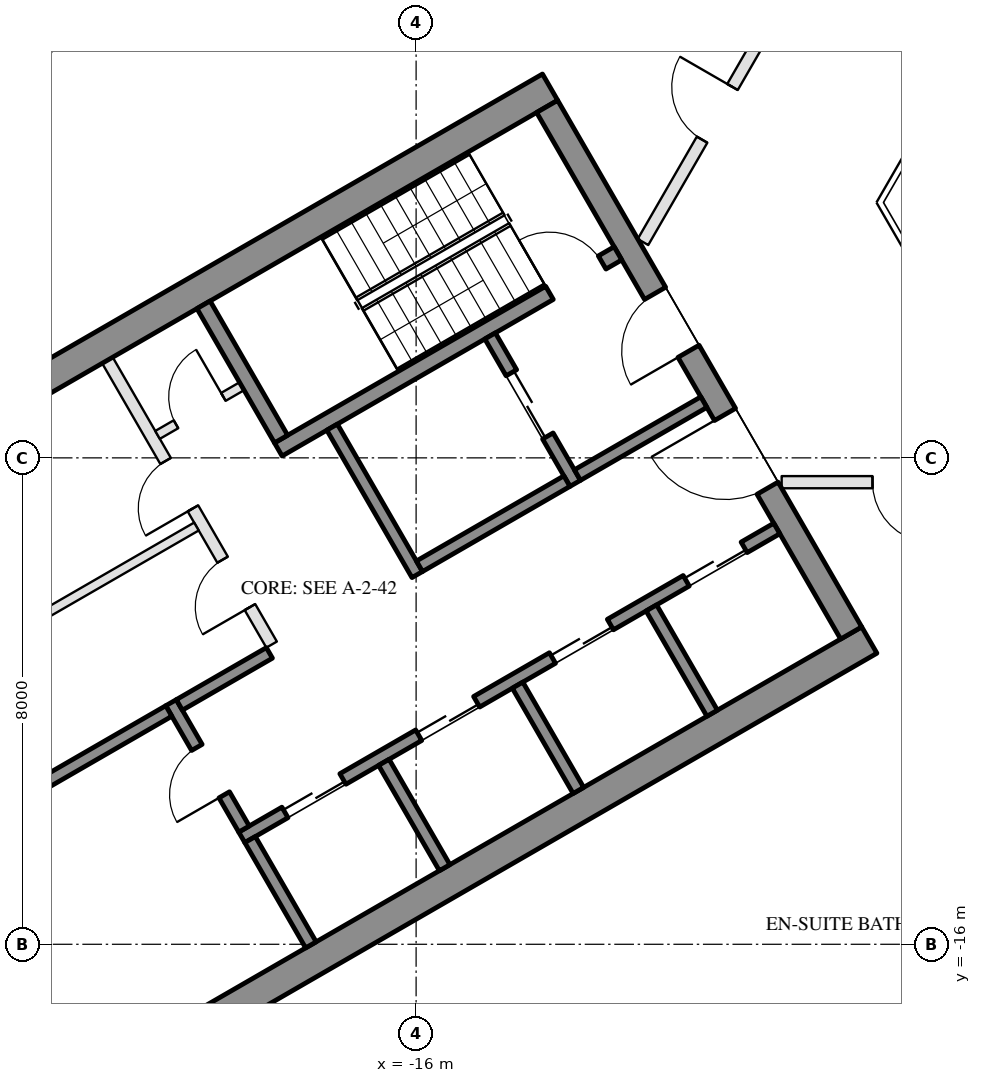
"""IFC4 building model, lengths in metres.
Left out: names, types, materials, properties, quantities, classifications, styles, units other than length and angle.
Written with IfcOpenShell. Run it as: python <this file> out.ifc"""

import sys

from ifc_helpers import new_model, si_unit, direction, frame, frame_2d, origin, place, context, subcontext, project, spatial, rectangle, extrude, element, fill, save


model = new_model("IFC4")
c1 = context("Model", 3, precision=1e-05, world=origin(), true_north=direction((0.0, 1.0)))
c2 = subcontext(c1, "Body", "Model", "MODEL_VIEW")
j1 = project(units=[si_unit("LENGTHUNIT", "METRE"), si_unit("PLANEANGLEUNIT", "RADIAN")], contexts=[c1])
p1 = place(None, origin())
s1 = spatial("IfcSite", under=j1, at=p1, CompositionType="ELEMENT")
p2 = place(p1, origin())
s2 = spatial("IfcBuilding", under=s1, at=p2, CompositionType="ELEMENT")
p3 = place(p2, frame((0.0, 0.0, 179.9)))
s3 = spatial("IfcBuildingStorey", under=s2, at=p3, CompositionType="ELEMENT", Elevation=179.9)
p4 = place(p3, frame((-20.309, 1.934, 0.0), z_axis=(0.0, 0.0, 1.0), x_axis=(-0.499992114976, -0.866029956157, 0.0)))
e1 = element("IfcWall", 1, at=p4, inside=s3, PredefinedType="SOLIDWALL", context=c2, shape_type="SweptSolid", body=[
    extrude(rectangle(XDim=6.74, YDim=0.35, at=frame_2d((3.37, 0.0))), origin(), (0.0, 0.0, 1.0), 3.55),
])
p5 = place(p4, frame((0.77, 0.0, 0.0)))
e2 = element("IfcOpeningElement", 2, at=p5, cuts=e1, PredefinedType="OPENING", context=c2, shape_type="SweptSolid", body=[
    extrude(rectangle(XDim=2.4, YDim=2.4, at=frame_2d((1.2, 1.2))), frame((0.0, 0.185, 0.0), z_axis=(0.0, -1.0, 0.0), x_axis=(1.0, 0.0, 0.0)), (0.0, 0.0, 1.0), 0.37),
])
p6 = place(p4, frame((3.47, 0.0, 0.3)))
e3 = element("IfcOpeningElement", 3, at=p6, cuts=e1, PredefinedType="OPENING", context=c2, shape_type="SweptSolid", body=[
    extrude(rectangle(XDim=2.9, YDim=2.65, at=frame_2d((1.45, 1.325))), frame((0.0, 0.185, 0.0), z_axis=(0.0, -1.0, 0.0), x_axis=(1.0, 0.0, 0.0)), (0.0, 0.0, 1.0), 0.37),
])
for number, where, z_axis, x_axis in (
    (4, (-13.797, -1.903, 0.0), (0.0, 0.0, 1.0), (-0.866, -0.5, 0.0)),
    (5, (-8.547, -10.997, 0.0), (0.0, 0.0, 1.0), (-0.866, -0.5, 0.0)),
):
    element("IfcWall", number, at=place(p3, frame(where, z_axis=z_axis, x_axis=x_axis)), inside=s3, PredefinedType="SHEAR", context=c2, shape_type="SweptSolid", body=[
        extrude(rectangle(XDim=14.837, YDim=0.5, at=frame_2d((7.418, 0.0))), origin(), (0.0, 0.0, 1.0), 3.5),
    ])
p7 = place(p3, frame((-13.845, -2.22, 0.0), z_axis=(0.0, 0.0, 1.0), x_axis=(0.500004234368, -0.866022959057, 0.0)))
e6 = element("IfcWall", 6, at=p7, inside=s3, PredefinedType="SHEAR", context=c2, shape_type="SweptSolid", body=[
    extrude(rectangle(XDim=10.0, YDim=0.4, at=frame_2d((5.0, 0.0))), origin(), (0.0, 0.0, 1.0), 3.5),
])
p8 = place(p7, frame((3.55, 0.0, 0.0)))
e7 = element("IfcOpeningElement", 7, at=p8, cuts=e6, PredefinedType="OPENING", context=c2, shape_type="SweptSolid", body=[
    extrude(rectangle(XDim=1.1, YDim=2.1, at=frame_2d((0.55, 1.05))), frame((0.0, 0.21, 0.0), z_axis=(0.0, -1.0, 0.0), x_axis=(1.0, 0.0, 0.0)), (0.0, 0.0, 1.0), 0.42),
])
p9 = place(p7, frame((5.85, 0.0, 0.0)))
e8 = element("IfcOpeningElement", 8, at=p9, cuts=e6, PredefinedType="OPENING", context=c2, shape_type="SweptSolid", body=[
    extrude(rectangle(XDim=1.4, YDim=2.1, at=frame_2d((0.7, 1.05))), frame((0.0, 0.21, 0.0), z_axis=(0.0, -1.0, 0.0), x_axis=(1.0, 0.0, 0.0)), (0.0, 0.0, 1.0), 0.42),
])
p10 = place(p3, frame((-12.681, -4.636, 0.0), z_axis=(0.0, 0.0, 1.0), x_axis=(-0.866021702275, -0.500006411147, 0.0)))
e9 = element("IfcWall", 9, at=p10, inside=s3, PredefinedType="SHEAR", context=c2, shape_type="SweptSolid", body=[
    extrude(rectangle(XDim=6.45, YDim=0.25, at=frame_2d((3.225, 0.0))), origin(), (0.0, 0.0, 1.0), 3.5),
])
p11 = place(p10, frame((0.3, 0.0, 0.0)))
e10 = element("IfcOpeningElement", 10, at=p11, cuts=e9, PredefinedType="OPENING", context=c2, shape_type="SweptSolid", body=[
    extrude(rectangle(XDim=1.0, YDim=2.1, at=frame_2d((0.5, 1.05))), frame((0.0, 0.135, 0.0), z_axis=(0.0, -1.0, 0.0), x_axis=(1.0, 0.0, 0.0)), (0.0, 0.0, 1.0), 0.27),
])
p12 = place(p3, frame((-19.496, -5.482, 0.0), z_axis=(0.0, 0.0, 1.0), x_axis=(0.499990435942, -0.866030925526, 0.0)))
e11 = element("IfcWall", 11, at=p12, inside=s3, PredefinedType="SHEAR", context=c2, shape_type="SweptSolid", body=[
    extrude(rectangle(XDim=2.55, YDim=0.25, at=frame_2d((1.275, 0.0))), origin(), (0.0, 0.0, 1.0), 3.5),
])
p13 = place(p3, frame((-17.381, -7.495, 0.0), z_axis=(0.0, 0.0, 1.0), x_axis=(0.500011755427, -0.866018616679, 0.0)))
e12 = element("IfcWall", 12, at=p13, inside=s3, PredefinedType="SHEAR", context=c2, shape_type="SweptSolid", body=[
    extrude(rectangle(XDim=2.8, YDim=0.2, at=frame_2d((1.4, 0.0))), origin(), (0.0, 0.0, 1.0), 3.5),
])
p14 = place(p3, frame((-14.783, -5.995, 0.0), z_axis=(0.0, 0.0, 1.0), x_axis=(0.49994636267, -0.866056369097, 0.0)))
e13 = element("IfcWall", 13, at=p14, inside=s3, PredefinedType="SHEAR", context=c2, shape_type="SweptSolid", body=[
    extrude(rectangle(XDim=2.8, YDim=0.2, at=frame_2d((1.4, 0.0))), origin(), (0.0, 0.0, 1.0), 3.5),
])
p15 = place(p14, frame((0.7, 0.0, 0.0)))
e14 = element("IfcOpeningElement", 14, at=p15, cuts=e13, PredefinedType="OPENING", context=c2, shape_type="SweptSolid", body=[
    extrude(rectangle(XDim=1.2, YDim=2.1, at=frame_2d((0.6, 1.05))), frame((0.0, 0.11, 0.0), z_axis=(0.0, -1.0, 0.0), x_axis=(1.0, 0.0, 0.0)), (0.0, 0.0, 1.0), 0.22),
])
p16 = place(p3, frame((-13.52, -8.383, 0.0), z_axis=(0.0, 0.0, 1.0), x_axis=(-0.866034573852, -0.49998411664, 0.0)))
e15 = element("IfcWall", 15, at=p16, inside=s3, PredefinedType="SHEAR", context=c2, shape_type="SweptSolid", body=[
    extrude(rectangle(XDim=2.8, YDim=0.2, at=frame_2d((1.4, 0.0))), origin(), (0.0, 0.0, 1.0), 3.5),
])
p17 = place(p3, frame((-11.268, -7.083, 0.0), z_axis=(0.0, 0.0, 1.0), x_axis=(-0.866050077142, -0.499957262057, 0.0)))
e16 = element("IfcWall", 16, at=p17, inside=s3, PredefinedType="SHEAR", context=c2, shape_type="SweptSolid", body=[
    extrude(rectangle(XDim=2.4, YDim=0.2, at=frame_2d((1.2, 0.0))), origin(), (0.0, 0.0, 1.0), 3.5),
])
p18 = place(p3, frame((-10.068, -9.162, 0.0), z_axis=(0.0, 0.0, 1.0), x_axis=(-0.866032725843, -0.499987317609, 0.0)))
e17 = element("IfcWall", 17, at=p18, inside=s3, PredefinedType="SHEAR", context=c2, shape_type="SweptSolid", body=[
    extrude(rectangle(XDim=10.16, YDim=0.2, at=frame_2d((5.08, 0.0))), origin(), (0.0, 0.0, 1.0), 3.5),
])
p19 = place(p18, frame((0.62, 0.0, 0.0)))
e18 = element("IfcOpeningElement", 18, at=p19, cuts=e17, PredefinedType="OPENING", context=c2, shape_type="SweptSolid", body=[
    extrude(rectangle(XDim=1.1, YDim=2.1, at=frame_2d((0.55, 1.05))), frame((0.0, 0.11, 0.0), z_axis=(0.0, -1.0, 0.0), x_axis=(1.0, 0.0, 0.0)), (0.0, 0.0, 1.0), 0.22),
])
p20 = place(p18, frame((3.16, 0.0, 0.0)))
e19 = element("IfcOpeningElement", 19, at=p20, cuts=e17, PredefinedType="OPENING", context=c2, shape_type="SweptSolid", body=[
    extrude(rectangle(XDim=1.1, YDim=2.1, at=frame_2d((0.55, 1.05))), frame((0.0, 0.11, 0.0), z_axis=(0.0, -1.0, 0.0), x_axis=(1.0, 0.0, 0.0)), (0.0, 0.0, 1.0), 0.22),
])
p21 = place(p18, frame((5.7, 0.0, 0.0)))
e20 = element("IfcOpeningElement", 20, at=p21, cuts=e17, PredefinedType="OPENING", context=c2, shape_type="SweptSolid", body=[
    extrude(rectangle(XDim=1.1, YDim=2.1, at=frame_2d((0.55, 1.05))), frame((0.0, 0.11, 0.0), z_axis=(0.0, -1.0, 0.0), x_axis=(1.0, 0.0, 0.0)), (0.0, 0.0, 1.0), 0.22),
])
p22 = place(p18, frame((8.24, 0.0, 0.0)))
e21 = element("IfcOpeningElement", 21, at=p22, cuts=e17, PredefinedType="OPENING", context=c2, shape_type="SweptSolid", body=[
    extrude(rectangle(XDim=1.1, YDim=2.1, at=frame_2d((0.55, 1.05))), frame((0.0, 0.11, 0.0), z_axis=(0.0, -1.0, 0.0), x_axis=(1.0, 0.0, 0.0)), (0.0, 0.0, 1.0), 0.22),
])
p23 = place(p3, frame((-20.031, -12.026, 0.0), z_axis=(0.0, 0.0, 1.0), x_axis=(0.500033551112, -0.866006032174, 0.0)))
e22 = element("IfcWall", 22, at=p23, inside=s3, PredefinedType="SHEAR", context=c2, shape_type="SweptSolid", body=[
    extrude(rectangle(XDim=2.4, YDim=0.2, at=frame_2d((1.2, 0.0))), origin(), (0.0, 0.0, 1.0), 3.5),
])
p24 = place(p23, frame((0.85, 0.0, 0.0)))
e23 = element("IfcOpeningElement", 23, at=p24, cuts=e22, PredefinedType="OPENING", context=c2, shape_type="SweptSolid", body=[
    extrude(rectangle(XDim=0.9, YDim=2.1, at=frame_2d((0.45, 1.05))), frame((0.0, 0.11, 0.0), z_axis=(0.0, -1.0, 0.0), x_axis=(1.0, 0.0, 0.0)), (0.0, 0.0, 1.0), 0.22),
])
p25 = place(p3, frame((-18.413, -11.208, 0.0), z_axis=(0.0, 0.0, 1.0), x_axis=(-0.866038183914, -0.499977863513, 0.0)))
e24 = element("IfcWall", 24, at=p25, inside=s3, PredefinedType="SHEAR", context=c2, shape_type="SweptSolid", body=[
    extrude(rectangle(XDim=1.71, YDim=0.2, at=frame_2d((0.855, 0.0))), origin(), (0.0, 0.0, 1.0), 3.5),
])
for number, where, z_axis, x_axis in (
    (25, (-12.131, -10.468, 0.0), (0.0, 0.0, 1.0), (0.5, -0.866, 0.0)),
    (26, (-14.331, -11.738, 0.0), (0.0, 0.0, 1.0), (0.5, -0.866, 0.0)),
    (27, (-16.531, -13.008, 0.0), (0.0, 0.0, 1.0), (0.5, -0.866, 0.0)),
    (28, (-18.73, -14.278, 0.0), (0.0, 0.0, 1.0), (0.5, -0.866, 0.0)),
):
    element("IfcWall", number, at=place(p3, frame(where, z_axis=z_axis, x_axis=x_axis)), inside=s3, PredefinedType="SHEAR", context=c2, shape_type="SweptSolid", body=[
        extrude(rectangle(XDim=2.0, YDim=0.2, at=frame_2d((1.0, 0.0))), origin(), (0.0, 0.0, 1.0), 3.5),
    ])
p26 = place(p3, frame((-20.067, -12.163, 0.0), z_axis=(0.0, 0.0, 1.0), x_axis=(-0.866055327414, -0.49994816717, 0.0)))
e29 = element("IfcWall", 29, at=p26, inside=s3, PredefinedType="SHEAR", context=c2, shape_type="SweptSolid", body=[
    extrude(rectangle(XDim=2.84, YDim=0.2, at=frame_2d((1.42, 0.0))), origin(), (0.0, 0.0, 1.0), 3.5),
])
p27 = place(p3, frame((-21.076, -6.395, 0.0), z_axis=(0.0, 0.0, 1.0), x_axis=(0.50001468107, -0.866016927499, 0.0)))
e30 = element("IfcWall", 30, at=p27, inside=s3, PredefinedType="PARTITIONING", context=c2, shape_type="SweptSolid", body=[
    extrude(rectangle(XDim=5.4, YDim=0.2, at=frame_2d((2.7, 0.0))), origin(), (0.0, 0.0, 1.0), 3.5),
])
p28 = place(p27, frame((1.913, 0.0, 0.0)))
e31 = element("IfcOpeningElement", 31, at=p28, cuts=e30, PredefinedType="OPENING", context=c2, shape_type="SweptSolid", body=[
    extrude(rectangle(XDim=0.9, YDim=2.1, at=frame_2d((0.45, 1.05))), frame((0.0, 0.11, 0.0), z_axis=(0.0, -1.0, 0.0), x_axis=(1.0, 0.0, 0.0)), (0.0, 0.0, 1.0), 0.22),
])
p29 = place(p27, frame((3.788, 0.0, 0.0)))
e32 = element("IfcOpeningElement", 32, at=p29, cuts=e30, PredefinedType="OPENING", context=c2, shape_type="SweptSolid", body=[
    extrude(rectangle(XDim=0.9, YDim=2.1, at=frame_2d((0.45, 1.05))), frame((0.0, 0.11, 0.0), z_axis=(0.0, -1.0, 0.0), x_axis=(1.0, 0.0, 0.0)), (0.0, 0.0, 1.0), 0.22),
])
p30 = place(p3, frame((-18.866, -6.822, 0.0), z_axis=(0.0, 0.0, 1.0), x_axis=(-0.866028054938, -0.499995408039, 0.0)))
e33 = element("IfcWall", 33, at=p30, inside=s3, PredefinedType="PARTITIONING", context=c2, shape_type="SweptSolid", body=[
    extrude(rectangle(XDim=1.6, YDim=0.15, at=frame_2d((0.8, 0.0))), origin(), (0.0, 0.0, 1.0), 3.5),
])
p31 = place(p30, frame((0.35, 0.0, 0.0)))
e34 = element("IfcOpeningElement", 34, at=p31, cuts=e33, PredefinedType="OPENING", context=c2, shape_type="SweptSolid", body=[
    extrude(rectangle(XDim=0.9, YDim=2.1, at=frame_2d((0.45, 1.05))), frame((0.0, 0.085, 0.0), z_axis=(0.0, -1.0, 0.0), x_axis=(1.0, 0.0, 0.0)), (0.0, 0.0, 1.0), 0.17),
])
p32 = place(p3, frame((-19.613, -9.13, 0.0), z_axis=(0.0, 0.0, 1.0), x_axis=(-0.866031734426, -0.499989034847, 0.0)))
e35 = element("IfcWall", 35, at=p32, inside=s3, PredefinedType="PARTITIONING", context=c2, shape_type="SweptSolid", body=[
    extrude(rectangle(XDim=6.95, YDim=0.15, at=frame_2d((3.475, 0.0))), origin(), (0.0, 0.0, 1.0), 3.5),
])
p33 = place(p3, frame((-6.0, -8.4, 0.0), z_axis=(0.0, 0.0, 1.0), x_axis=(-1.0, 0.0, 0.0)))
e36 = element("IfcWall", 36, at=p33, inside=s3, PredefinedType="PARTITIONING", context=c2, shape_type="SweptSolid", body=[
    extrude(rectangle(XDim=3.988, YDim=0.2, at=frame_2d((1.994, 0.0))), origin(), (0.0, 0.0, 1.0), 2.95),
])
p34 = place(p33, frame((1.494, 0.0, 0.0)))
e37 = element("IfcOpeningElement", 37, at=p34, cuts=e36, PredefinedType="OPENING", context=c2, shape_type="SweptSolid", body=[
    extrude(rectangle(XDim=1.0, YDim=2.1, at=frame_2d((0.5, 1.05))), frame((0.0, 0.11, 0.0), z_axis=(0.0, -1.0, 0.0), x_axis=(1.0, 0.0, 0.0)), (0.0, 0.0, 1.0), 0.22),
])
p35 = place(p3, frame((-12.269, -4.45, 0.0), z_axis=(0.0, 0.0, 1.0), x_axis=(0.500012125002, 0.866018403298, 0.0)))
e38 = element("IfcWall", 38, at=p35, inside=s3, PredefinedType="PARTITIONING", context=c2, shape_type="SweptSolid", body=[
    extrude(rectangle(XDim=4.888, YDim=0.2, at=frame_2d((2.444, 0.0))), origin(), (0.0, 0.0, 1.0), 2.95),
])
p36 = place(p35, frame((1.944, 0.0, 0.0)))
e39 = element("IfcOpeningElement", 39, at=p36, cuts=e38, PredefinedType="OPENING", context=c2, shape_type="SweptSolid", body=[
    extrude(rectangle(XDim=1.0, YDim=2.1, at=frame_2d((0.5, 1.05))), frame((0.0, 0.11, 0.0), z_axis=(0.0, -1.0, 0.0), x_axis=(1.0, 0.0, 0.0)), (0.0, 0.0, 1.0), 0.22),
])
p37 = place(p15, origin())
e40 = element("IfcDoor", 40, at=p37, inside=s3, OperationType="DOUBLE_DOOR_SLIDING", PredefinedType="DOOR", context=c2, shape_type="SweptSolid", body=[
    extrude(rectangle(XDim=1.2, YDim=2.1, at=frame_2d((0.6, 1.05))), frame((0.0, 0.025, 0.0), z_axis=(0.0, -1.0, 0.0), x_axis=(1.0, 0.0, 0.0)), (0.0, 0.0, 1.0), 0.05),
])
fill(e14, e40)
p38 = place(p31, frame((0.9, 0.0, 0.0), z_axis=(0.0, 0.0, 1.0), x_axis=(-1.0, 0.0, 0.0)))
e41 = element("IfcDoor", 41, at=p38, inside=s3, OperationType="SINGLE_SWING_RIGHT", PredefinedType="DOOR", context=c2, shape_type="SweptSolid", body=[
    extrude(rectangle(XDim=0.9, YDim=2.1, at=frame_2d((0.45, 1.05))), frame((0.0, 0.025, 0.0), z_axis=(0.0, -1.0, 0.0), x_axis=(1.0, 0.0, 0.0)), (0.0, 0.0, 1.0), 0.05),
])
fill(e34, e41)
p39 = place(p19, origin())
e42 = element("IfcDoor", 42, at=p39, inside=s3, OperationType="DOUBLE_DOOR_SLIDING", PredefinedType="DOOR", context=c2, shape_type="SweptSolid", body=[
    extrude(rectangle(XDim=1.1, YDim=2.1, at=frame_2d((0.55, 1.05))), frame((0.0, 0.025, 0.0), z_axis=(0.0, -1.0, 0.0), x_axis=(1.0, 0.0, 0.0)), (0.0, 0.0, 1.0), 0.05),
])
fill(e18, e42)
p40 = place(p20, origin())
e43 = element("IfcDoor", 43, at=p40, inside=s3, OperationType="DOUBLE_DOOR_SLIDING", PredefinedType="DOOR", context=c2, shape_type="SweptSolid", body=[
    extrude(rectangle(XDim=1.1, YDim=2.1, at=frame_2d((0.55, 1.05))), frame((0.0, 0.025, 0.0), z_axis=(0.0, -1.0, 0.0), x_axis=(1.0, 0.0, 0.0)), (0.0, 0.0, 1.0), 0.05),
])
fill(e19, e43)
p41 = place(p21, origin())
e44 = element("IfcDoor", 44, at=p41, inside=s3, OperationType="DOUBLE_DOOR_SLIDING", PredefinedType="DOOR", context=c2, shape_type="SweptSolid", body=[
    extrude(rectangle(XDim=1.1, YDim=2.1, at=frame_2d((0.55, 1.05))), frame((0.0, 0.025, 0.0), z_axis=(0.0, -1.0, 0.0), x_axis=(1.0, 0.0, 0.0)), (0.0, 0.0, 1.0), 0.05),
])
fill(e20, e44)
p42 = place(p22, origin())
e45 = element("IfcDoor", 45, at=p42, inside=s3, OperationType="DOUBLE_DOOR_SLIDING", PredefinedType="DOOR", context=c2, shape_type="SweptSolid", body=[
    extrude(rectangle(XDim=1.1, YDim=2.1, at=frame_2d((0.55, 1.05))), frame((0.0, 0.025, 0.0), z_axis=(0.0, -1.0, 0.0), x_axis=(1.0, 0.0, 0.0)), (0.0, 0.0, 1.0), 0.05),
])
fill(e21, e45)
p43 = place(p24, frame((0.9, 0.0, 0.0), z_axis=(0.0, 0.0, 1.0), x_axis=(-1.0, 0.0, 0.0)))
e46 = element("IfcDoor", 46, at=p43, inside=s3, OperationType="SINGLE_SWING_LEFT", PredefinedType="DOOR", context=c2, shape_type="SweptSolid", body=[
    extrude(rectangle(XDim=0.9, YDim=2.1, at=frame_2d((0.45, 1.05))), frame((0.0, 0.025, 0.0), z_axis=(0.0, -1.0, 0.0), x_axis=(1.0, 0.0, 0.0)), (0.0, 0.0, 1.0), 0.05),
])
fill(e23, e46)
p44 = place(p28, frame((0.9, 0.0, 0.0), z_axis=(0.0, 0.0, 1.0), x_axis=(-1.0, 0.0, 0.0)))
e47 = element("IfcDoor", 47, at=p44, inside=s3, OperationType="SINGLE_SWING_LEFT", PredefinedType="DOOR", context=c2, shape_type="SweptSolid", body=[
    extrude(rectangle(XDim=0.9, YDim=2.1, at=frame_2d((0.45, 1.05))), frame((0.0, 0.025, 0.0), z_axis=(0.0, -1.0, 0.0), x_axis=(1.0, 0.0, 0.0)), (0.0, 0.0, 1.0), 0.05),
])
fill(e31, e47)
p45 = place(p29, frame((0.9, 0.0, 0.0), z_axis=(0.0, 0.0, 1.0), x_axis=(-1.0, 0.0, 0.0)))
e48 = element("IfcDoor", 48, at=p45, inside=s3, OperationType="SINGLE_SWING_LEFT", PredefinedType="DOOR", context=c2, shape_type="SweptSolid", body=[
    extrude(rectangle(XDim=0.9, YDim=2.1, at=frame_2d((0.45, 1.05))), frame((0.0, 0.025, 0.0), z_axis=(0.0, -1.0, 0.0), x_axis=(1.0, 0.0, 0.0)), (0.0, 0.0, 1.0), 0.05),
])
fill(e32, e48)
p46 = place(p8, frame((1.1, 0.0, 0.0), z_axis=(0.0, 0.0, 1.0), x_axis=(-1.0, 0.0, 0.0)))
e49 = element("IfcDoor", 49, at=p46, inside=s3, OperationType="SINGLE_SWING_LEFT", PredefinedType="DOOR", context=c2, shape_type="SweptSolid", body=[
    extrude(rectangle(XDim=1.1, YDim=2.1, at=frame_2d((0.55, 1.05))), frame((0.0, 0.025, 0.0), z_axis=(0.0, -1.0, 0.0), x_axis=(1.0, 0.0, 0.0)), (0.0, 0.0, 1.0), 0.05),
])
fill(e7, e49)
p47 = place(p9, frame((1.4, 0.0, 0.0), z_axis=(0.0, 0.0, 1.0), x_axis=(-1.0, 0.0, 0.0)))
e50 = element("IfcDoor", 50, at=p47, inside=s3, OperationType="DOUBLE_DOOR_SINGLE_SWING", PredefinedType="DOOR", context=c2, shape_type="SweptSolid", body=[
    extrude(rectangle(XDim=1.4, YDim=2.1, at=frame_2d((0.7, 1.05))), frame((0.0, 0.025, 0.0), z_axis=(0.0, -1.0, 0.0), x_axis=(1.0, 0.0, 0.0)), (0.0, 0.0, 1.0), 0.05),
])
fill(e8, e50)
p48 = place(p11, frame((1.0, 0.0, 0.0), z_axis=(0.0, 0.0, 1.0), x_axis=(-1.0, 0.0, 0.0)))
e51 = element("IfcDoor", 51, at=p48, inside=s3, OperationType="SINGLE_SWING_LEFT", PredefinedType="DOOR", context=c2, shape_type="SweptSolid", body=[
    extrude(rectangle(XDim=1.0, YDim=2.1, at=frame_2d((0.5, 1.05))), frame((0.0, 0.025, 0.0), z_axis=(0.0, -1.0, 0.0), x_axis=(1.0, 0.0, 0.0)), (0.0, 0.0, 1.0), 0.05),
])
fill(e10, e51)
p49 = place(p34, origin())
e52 = element("IfcDoor", 52, at=p49, inside=s3, OperationType="SINGLE_SWING_LEFT", PredefinedType="DOOR", context=c2, shape_type="SweptSolid", body=[
    extrude(rectangle(XDim=1.0, YDim=2.1, at=frame_2d((0.5, 1.05))), frame((0.0, 0.025, 0.0), z_axis=(0.0, -1.0, 0.0), x_axis=(1.0, 0.0, 0.0)), (0.0, 0.0, 1.0), 0.05),
])
fill(e37, e52)
p50 = place(p36, origin())
e53 = element("IfcDoor", 53, at=p50, inside=s3, OperationType="SINGLE_SWING_RIGHT", PredefinedType="DOOR", context=c2, shape_type="SweptSolid", body=[
    extrude(rectangle(XDim=1.0, YDim=2.1, at=frame_2d((0.5, 1.05))), frame((0.0, 0.025, 0.0), z_axis=(0.0, -1.0, 0.0), x_axis=(1.0, 0.0, 0.0)), (0.0, 0.0, 1.0), 0.05),
])
fill(e39, e53)
save(model, sys.argv[1])
